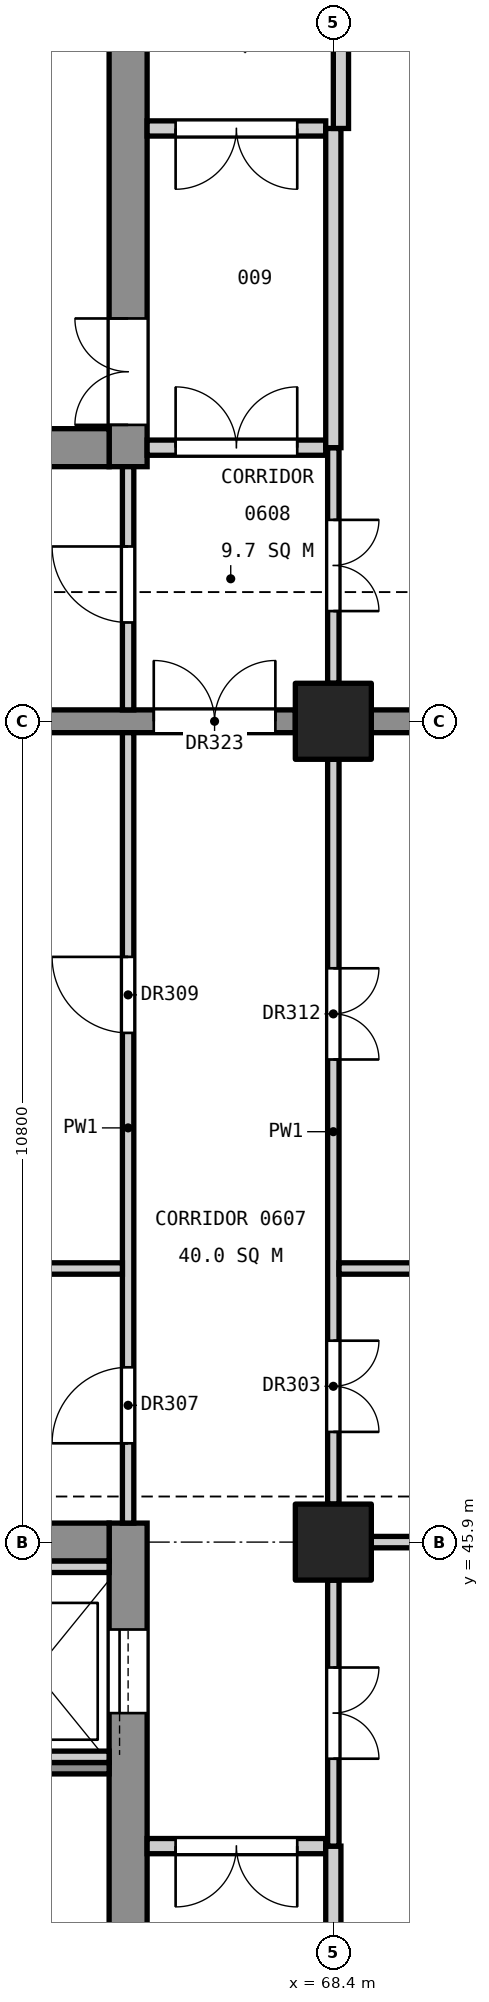
"""IFC4 building model, lengths in metres.
Left out: names, types, materials, properties, quantities, classifications, styles, units other than length and angle.
Written with IfcOpenShell. Run it as: python <this file> out.ifc"""

import sys

from ifc_helpers import new_model, si_unit, direction, frame, frame_2d, origin, origin_2d, place, context, subcontext, project, spatial, rectangle, extrude, element, fill, save


model = new_model("IFC4")
c1 = context("Model", 3, precision=1e-05, world=origin(), true_north=direction((0.0, 1.0)))
c2 = subcontext(c1, "Body", "Model", "MODEL_VIEW")
j1 = project(units=[si_unit("LENGTHUNIT", "METRE"), si_unit("PLANEANGLEUNIT", "RADIAN")], contexts=[c1])
p1 = place(None, origin())
s1 = spatial("IfcSite", under=j1, at=p1, CompositionType="ELEMENT")
p2 = place(p1, origin())
s2 = spatial("IfcBuilding", under=s1, at=p2, CompositionType="ELEMENT")
p3 = place(p2, frame((0.0, 0.0, 31.8)))
s3 = spatial("IfcBuildingStorey", under=s2, at=p3, CompositionType="ELEMENT", Elevation=31.8)
for number, where, z_axis, x_axis in (
    (1, (68.4, 45.9, 0.0), (0.0, 0.0, 1.0), (1.0, 0.0, 0.0)),
    (2, (68.4, 56.7, 0.0), (0.0, 0.0, 1.0), (1.0, 0.0, 0.0)),
):
    element("IfcColumn", number, at=place(p3, frame(where, z_axis=z_axis, x_axis=x_axis)), inside=s3, PredefinedType="COLUMN", context=c2, shape_type="SweptSolid", body=[
        extrude(rectangle(XDim=1.0, YDim=1.0, at=origin_2d()), origin(), (0.0, 0.0, 1.0), 4.8),
    ])
p4 = place(p3, frame((65.7, 34.85, 0.0), z_axis=(0.0, 0.0, 1.0), x_axis=(0.0, 1.0, 0.0)))
e3 = element("IfcWall", 3, at=p4, inside=s3, PredefinedType="SHEAR", context=c2, shape_type="SweptSolid", body=[
    extrude(rectangle(XDim=11.3, YDim=0.5, at=frame_2d((5.65, 0.0))), origin(), (0.0, 0.0, 1.0), 4.55),
])
p5 = place(p4, frame((0.55, 0.0, 0.0)))
e4 = element("IfcOpeningElement", 4, at=p5, cuts=e3, PredefinedType="OPENING", context=c2, shape_type="SweptSolid", body=[
    extrude(rectangle(XDim=1.4, YDim=2.1, at=frame_2d((0.7, 1.05))), frame((0.0, 0.26, 0.0), z_axis=(0.0, -1.0, 0.0), x_axis=(1.0, 0.0, 0.0)), (0.0, 0.0, 1.0), 0.52),
])
p6 = place(p4, frame((8.8, 0.0, 0.0)))
e5 = element("IfcOpeningElement", 5, at=p6, cuts=e3, PredefinedType="OPENING", context=c2, shape_type="SweptSolid", body=[
    extrude(rectangle(XDim=1.1, YDim=2.1, at=frame_2d((0.55, 1.05))), frame((0.0, 0.26, 0.0), z_axis=(0.0, -1.0, 0.0), x_axis=(1.0, 0.0, 0.0)), (0.0, 0.0, 1.0), 0.52),
])
p7 = place(p3, frame((61.45, 45.9, 0.0), z_axis=(0.0, 0.0, 1.0), x_axis=(1.0, 0.0, 0.0)))
e6 = element("IfcWall", 6, at=p7, inside=s3, PredefinedType="SHEAR", context=c2, shape_type="SweptSolid", body=[
    extrude(rectangle(XDim=4.0, YDim=0.5, at=frame_2d((2.0, 0.0))), origin(), (0.0, 0.0, 1.0), 4.55),
])
p8 = place(p3, frame((65.7, 60.05, 0.0), z_axis=(0.0, 0.0, 1.0), x_axis=(0.0, 1.0, 0.0)))
e7 = element("IfcWall", 7, at=p8, inside=s3, PredefinedType="SHEAR", context=c2, shape_type="SweptSolid", body=[
    extrude(rectangle(XDim=14.9, YDim=0.5, at=frame_2d((7.45, 0.0))), origin(), (0.0, 0.0, 1.0), 4.55),
])
p9 = place(p8, frame((0.55, 0.0, 0.0)))
e8 = element("IfcOpeningElement", 8, at=p9, cuts=e7, PredefinedType="OPENING", context=c2, shape_type="SweptSolid", body=[
    extrude(rectangle(XDim=1.4, YDim=2.1, at=frame_2d((0.7, 1.05))), frame((0.0, 0.26, 0.0), z_axis=(0.0, -1.0, 0.0), x_axis=(1.0, 0.0, 0.0)), (0.0, 0.0, 1.0), 0.52),
])
p10 = place(p8, frame((8.85, 0.0, 0.0)))
e9 = element("IfcOpeningElement", 9, at=p10, cuts=e7, PredefinedType="OPENING", context=c2, shape_type="SweptSolid", body=[
    extrude(rectangle(XDim=1.1, YDim=2.1, at=frame_2d((0.55, 1.05))), frame((0.0, 0.26, 0.0), z_axis=(0.0, -1.0, 0.0), x_axis=(1.0, 0.0, 0.0)), (0.0, 0.0, 1.0), 0.52),
])
p11 = place(p8, frame((11.4, 0.0, 0.0)))
e10 = element("IfcOpeningElement", 10, at=p11, cuts=e7, PredefinedType="OPENING", context=c2, shape_type="SweptSolid", body=[
    extrude(rectangle(XDim=1.1, YDim=2.1, at=frame_2d((0.55, 1.05))), frame((0.0, 0.26, 0.0), z_axis=(0.0, -1.0, 0.0), x_axis=(1.0, 0.0, 0.0)), (0.0, 0.0, 1.0), 0.52),
])
p12 = place(p3, frame((61.45, 60.3, 0.0), z_axis=(0.0, 0.0, 1.0), x_axis=(1.0, 0.0, 0.0)))
e11 = element("IfcWall", 11, at=p12, inside=s3, PredefinedType="SHEAR", context=c2, shape_type="SweptSolid", body=[
    extrude(rectangle(XDim=4.0, YDim=0.5, at=frame_2d((2.0, 0.0))), origin(), (0.0, 0.0, 1.0), 4.55),
])
p13 = place(p3, frame((61.7, 56.7, 0.0), z_axis=(0.0, 0.0, 1.0), x_axis=(1.0, 0.0, 0.0)))
e12 = element("IfcWall", 12, at=p13, inside=s3, PredefinedType="SHEAR", context=c2, shape_type="SweptSolid", body=[
    extrude(rectangle(XDim=6.2, YDim=0.3, at=frame_2d((3.1, 0.0))), origin(), (0.0, 0.0, 1.0), 4.55),
])
p14 = place(p13, frame((4.337, 0.0, 0.0)))
e13 = element("IfcOpeningElement", 13, at=p14, cuts=e12, PredefinedType="OPENING", context=c2, shape_type="SweptSolid", body=[
    extrude(rectangle(XDim=1.6, YDim=2.1, at=frame_2d((0.8, 1.05))), frame((0.0, 0.16, 0.0), z_axis=(0.0, -1.0, 0.0), x_axis=(1.0, 0.0, 0.0)), (0.0, 0.0, 1.0), 0.32),
])
p15 = place(p3, frame((68.9, 56.7, 0.0), z_axis=(0.0, 0.0, 1.0), x_axis=(1.0, 0.0, 0.0)))
e14 = element("IfcWall", 14, at=p15, inside=s3, PredefinedType="SHEAR", context=c2, shape_type="SweptSolid", body=[
    extrude(rectangle(XDim=9.8, YDim=0.3, at=frame_2d((4.9, 0.0))), origin(), (0.0, 0.0, 1.0), 4.55),
])
p16 = place(p3, frame((61.45, 42.925, 0.0), z_axis=(0.0, 0.0, 1.0), x_axis=(1.0, 0.0, 0.0)))
e15 = element("IfcWall", 15, at=p16, inside=s3, PredefinedType="SOLIDWALL", context=c2, shape_type="SweptSolid", body=[
    extrude(rectangle(XDim=4.0, YDim=0.15, at=frame_2d((2.0, 0.0))), origin(), (0.0, 0.0, 1.0), 4.55),
])
for number, where, z_axis, x_axis in (
    (16, (63.65, 43.075, 0.0), (0.0, 0.0, 1.0), (1.0, 0.0, 0.0)),
    (17, (63.65, 45.575, 0.0), (0.0, 0.0, 1.0), (1.0, 0.0, 0.0)),
):
    element("IfcWall", number, at=place(p3, frame(where, z_axis=z_axis, x_axis=x_axis)), inside=s3, PredefinedType="SOLIDWALL", context=c2, shape_type="SweptSolid", body=[
        extrude(rectangle(XDim=1.8, YDim=0.15, at=frame_2d((0.9, 0.0))), origin(), (0.0, 0.0, 1.0), 4.8),
    ])
p17 = place(p3, frame((65.7, 46.15, 0.0), z_axis=(0.0, 0.0, 1.0), x_axis=(0.0, 1.0, 0.0)))
e18 = element("IfcWall", 18, at=p17, inside=s3, PredefinedType="PARTITIONING", context=c2, shape_type="SweptSolid", body=[
    extrude(rectangle(XDim=10.4, YDim=0.15, at=frame_2d((5.2, 0.0))), origin(), (0.0, 0.0, 1.0), 3.55),
])
p18 = place(p17, frame((1.05, 0.0, 0.0)))
e19 = element("IfcOpeningElement", 19, at=p18, cuts=e18, PredefinedType="OPENING", context=c2, shape_type="SweptSolid", body=[
    extrude(rectangle(XDim=1.0, YDim=2.1, at=frame_2d((0.5, 1.05))), frame((0.0, 0.085, 0.0), z_axis=(0.0, -1.0, 0.0), x_axis=(1.0, 0.0, 0.0)), (0.0, 0.0, 1.0), 0.17),
])
p19 = place(p17, frame((6.45, 0.0, 0.0)))
e20 = element("IfcOpeningElement", 20, at=p19, cuts=e18, PredefinedType="OPENING", context=c2, shape_type="SweptSolid", body=[
    extrude(rectangle(XDim=1.0, YDim=2.1, at=frame_2d((0.5, 1.05))), frame((0.0, 0.085, 0.0), z_axis=(0.0, -1.0, 0.0), x_axis=(1.0, 0.0, 0.0)), (0.0, 0.0, 1.0), 0.17),
])
p20 = place(p3, frame((65.7, 56.85, 0.0), z_axis=(0.0, 0.0, 1.0), x_axis=(0.0, 1.0, 0.0)))
e21 = element("IfcWall", 21, at=p20, inside=s3, PredefinedType="PARTITIONING", context=c2, shape_type="SweptSolid", body=[
    extrude(rectangle(XDim=3.2, YDim=0.15, at=frame_2d((1.6, 0.0))), origin(), (0.0, 0.0, 1.0), 3.55),
])
p21 = place(p20, frame((1.15, 0.0, 0.0)))
e22 = element("IfcOpeningElement", 22, at=p21, cuts=e21, PredefinedType="OPENING", context=c2, shape_type="SweptSolid", body=[
    extrude(rectangle(XDim=1.0, YDim=2.1, at=frame_2d((0.5, 1.05))), frame((0.0, 0.085, 0.0), z_axis=(0.0, -1.0, 0.0), x_axis=(1.0, 0.0, 0.0)), (0.0, 0.0, 1.0), 0.17),
])
p22 = place(p3, frame((61.35, 49.5, 0.0), z_axis=(0.0, 0.0, 1.0), x_axis=(1.0, 0.0, 0.0)))
e23 = element("IfcWall", 23, at=p22, inside=s3, PredefinedType="PARTITIONING", context=c2, shape_type="SweptSolid", body=[
    extrude(rectangle(XDim=4.275, YDim=0.15, at=frame_2d((2.137, 0.0))), origin(), (0.0, 0.0, 1.0), 3.85),
])
p23 = place(p3, frame((65.95, 41.9, 0.0), z_axis=(0.0, 0.0, 1.0), x_axis=(1.0, 0.0, 0.0)))
e24 = element("IfcWall", 24, at=p23, inside=s3, PredefinedType="PARTITIONING", context=c2, shape_type="SweptSolid", body=[
    extrude(rectangle(XDim=2.35, YDim=0.2, at=frame_2d((1.175, 0.0))), origin(), (0.0, 0.0, 1.0), 3.55),
])
p24 = place(p23, frame((0.375, 0.0, 0.0)))
e25 = element("IfcOpeningElement", 25, at=p24, cuts=e24, PredefinedType="OPENING", context=c2, shape_type="SweptSolid", body=[
    extrude(rectangle(XDim=1.6, YDim=2.1, at=frame_2d((0.8, 1.05))), frame((0.0, 0.11, 0.0), z_axis=(0.0, -1.0, 0.0), x_axis=(1.0, 0.0, 0.0)), (0.0, 0.0, 1.0), 0.22),
])
p25 = place(p3, frame((65.95, 60.3, 0.0), z_axis=(0.0, 0.0, 1.0), x_axis=(1.0, 0.0, 0.0)))
e26 = element("IfcWall", 26, at=p25, inside=s3, PredefinedType="PARTITIONING", context=c2, shape_type="SweptSolid", body=[
    extrude(rectangle(XDim=2.35, YDim=0.2, at=frame_2d((1.175, 0.0))), origin(), (0.0, 0.0, 1.0), 3.85),
])
p26 = place(p25, frame((0.375, 0.0, 0.0)))
e27 = element("IfcOpeningElement", 27, at=p26, cuts=e26, PredefinedType="OPENING", context=c2, shape_type="SweptSolid", body=[
    extrude(rectangle(XDim=1.6, YDim=2.1, at=frame_2d((0.8, 1.05))), frame((0.0, 0.11, 0.0), z_axis=(0.0, -1.0, 0.0), x_axis=(1.0, 0.0, 0.0)), (0.0, 0.0, 1.0), 0.22),
])
p27 = place(p3, frame((65.95, 64.5, 0.0), z_axis=(0.0, 0.0, 1.0), x_axis=(1.0, 0.0, 0.0)))
e28 = element("IfcWall", 28, at=p27, inside=s3, PredefinedType="PARTITIONING", context=c2, shape_type="SweptSolid", body=[
    extrude(rectangle(XDim=2.35, YDim=0.2, at=frame_2d((1.175, 0.0))), origin(), (0.0, 0.0, 1.0), 3.55),
])
p28 = place(p27, frame((0.375, 0.0, 0.0)))
e29 = element("IfcOpeningElement", 29, at=p28, cuts=e28, PredefinedType="OPENING", context=c2, shape_type="SweptSolid", body=[
    extrude(rectangle(XDim=1.6, YDim=2.1, at=frame_2d((0.8, 1.05))), frame((0.0, 0.11, 0.0), z_axis=(0.0, -1.0, 0.0), x_axis=(1.0, 0.0, 0.0)), (0.0, 0.0, 1.0), 0.22),
])
p29 = place(p3, frame((68.4, 35.6, 0.0), z_axis=(0.0, 0.0, 1.0), x_axis=(0.0, 1.0, 0.0)))
e30 = element("IfcWall", 30, at=p29, inside=s3, PredefinedType="PARTITIONING", context=c2, shape_type="SweptSolid", body=[
    extrude(rectangle(XDim=6.3, YDim=0.2, at=frame_2d((3.15, 0.0))), origin(), (0.0, 0.0, 1.0), 3.55),
])
p30 = place(p3, frame((68.4, 41.9, 0.0), z_axis=(0.0, 0.0, 1.0), x_axis=(0.0, 1.0, 0.0)))
e31 = element("IfcWall", 31, at=p30, inside=s3, PredefinedType="PARTITIONING", context=c2, shape_type="SweptSolid", body=[
    extrude(rectangle(XDim=3.5, YDim=0.15, at=frame_2d((1.75, 0.0))), origin(), (0.0, 0.0, 1.0), 3.55),
])
p31 = place(p30, frame((1.15, 0.0, 0.0)))
e32 = element("IfcOpeningElement", 32, at=p31, cuts=e31, PredefinedType="OPENING", context=c2, shape_type="SweptSolid", body=[
    extrude(rectangle(XDim=1.2, YDim=2.1, at=frame_2d((0.6, 1.05))), frame((0.0, 0.085, 0.0), z_axis=(0.0, -1.0, 0.0), x_axis=(1.0, 0.0, 0.0)), (0.0, 0.0, 1.0), 0.17),
])
p32 = place(p3, frame((68.4, 46.4, 0.0), z_axis=(0.0, 0.0, 1.0), x_axis=(0.0, 1.0, 0.0)))
e33 = element("IfcWall", 33, at=p32, inside=s3, PredefinedType="PARTITIONING", context=c2, shape_type="SweptSolid", body=[
    extrude(rectangle(XDim=9.8, YDim=0.15, at=frame_2d((4.9, 0.0))), origin(), (0.0, 0.0, 1.0), 3.55),
])
p33 = place(p32, frame((0.95, 0.0, 0.0)))
e34 = element("IfcOpeningElement", 34, at=p33, cuts=e33, PredefinedType="OPENING", context=c2, shape_type="SweptSolid", body=[
    extrude(rectangle(XDim=1.2, YDim=2.1, at=frame_2d((0.6, 1.05))), frame((0.0, 0.085, 0.0), z_axis=(0.0, -1.0, 0.0), x_axis=(1.0, 0.0, 0.0)), (0.0, 0.0, 1.0), 0.17),
])
p34 = place(p32, frame((5.85, 0.0, 0.0)))
e35 = element("IfcOpeningElement", 35, at=p34, cuts=e33, PredefinedType="OPENING", context=c2, shape_type="SweptSolid", body=[
    extrude(rectangle(XDim=1.2, YDim=2.1, at=frame_2d((0.6, 1.05))), frame((0.0, 0.085, 0.0), z_axis=(0.0, -1.0, 0.0), x_axis=(1.0, 0.0, 0.0)), (0.0, 0.0, 1.0), 0.17),
])
p35 = place(p3, frame((68.4, 57.2, 0.0), z_axis=(0.0, 0.0, 1.0), x_axis=(0.0, 1.0, 0.0)))
e36 = element("IfcWall", 36, at=p35, inside=s3, PredefinedType="PARTITIONING", context=c2, shape_type="SweptSolid", body=[
    extrude(rectangle(XDim=3.1, YDim=0.15, at=frame_2d((1.55, 0.0))), origin(), (0.0, 0.0, 1.0), 3.55),
])
p36 = place(p35, frame((0.95, 0.0, 0.0)))
e37 = element("IfcOpeningElement", 37, at=p36, cuts=e36, PredefinedType="OPENING", context=c2, shape_type="SweptSolid", body=[
    extrude(rectangle(XDim=1.2, YDim=2.1, at=frame_2d((0.6, 1.05))), frame((0.0, 0.085, 0.0), z_axis=(0.0, -1.0, 0.0), x_axis=(1.0, 0.0, 0.0)), (0.0, 0.0, 1.0), 0.17),
])
p37 = place(p3, frame((68.4, 60.3, 0.0), z_axis=(0.0, 0.0, 1.0), x_axis=(0.0, 1.0, 0.0)))
e38 = element("IfcWall", 38, at=p37, inside=s3, PredefinedType="PARTITIONING", context=c2, shape_type="SweptSolid", body=[
    extrude(rectangle(XDim=4.2, YDim=0.2, at=frame_2d((2.1, 0.0))), origin(), (0.0, 0.0, 1.0), 3.55),
])
p38 = place(p3, frame((68.5, 64.5, 0.0), z_axis=(0.0, 0.0, 1.0), x_axis=(0.0, 1.0, 0.0)))
e39 = element("IfcWall", 39, at=p38, inside=s3, PredefinedType="PARTITIONING", context=c2, shape_type="SweptSolid", body=[
    extrude(rectangle(XDim=2.5, YDim=0.2, at=frame_2d((1.25, 0.0))), origin(), (0.0, 0.0, 1.0), 3.55),
])
p39 = place(p3, frame((68.9, 45.9, 0.0), z_axis=(0.0, 0.0, 1.0), x_axis=(1.0, 0.0, 0.0)))
e40 = element("IfcWall", 40, at=p39, inside=s3, PredefinedType="PARTITIONING", context=c2, shape_type="SweptSolid", body=[
    extrude(rectangle(XDim=9.8, YDim=0.15, at=frame_2d((4.9, 0.0))), origin(), (0.0, 0.0, 1.0), 3.85),
])
p40 = place(p3, frame((68.475, 49.5, 0.0), z_axis=(0.0, 0.0, 1.0), x_axis=(1.0, 0.0, 0.0)))
e41 = element("IfcWall", 41, at=p40, inside=s3, PredefinedType="PARTITIONING", context=c2, shape_type="SweptSolid", body=[
    extrude(rectangle(XDim=10.575, YDim=0.15, at=frame_2d((5.288, 0.0))), origin(), (0.0, 0.0, 1.0), 3.85),
])
p41 = place(p9, origin())
e42 = element("IfcDoor", 42, at=p41, inside=s3, OperationType="DOUBLE_DOOR_SINGLE_SWING", PredefinedType="DOOR", context=c2, shape_type="SweptSolid", body=[
    extrude(rectangle(XDim=1.4, YDim=2.1, at=frame_2d((0.7, 1.05))), frame((0.0, 0.025, 0.0), z_axis=(0.0, -1.0, 0.0), x_axis=(1.0, 0.0, 0.0)), (0.0, 0.0, 1.0), 0.05),
])
fill(e8, e42)
p42 = place(p6, origin())
e43 = element("IfcDoor", 43, at=p42, inside=s3, OperationType="SLIDING_TO_LEFT", PredefinedType="DOOR", context=c2, shape_type="SweptSolid", body=[
    extrude(rectangle(XDim=1.1, YDim=2.1, at=frame_2d((0.55, 1.05))), frame((0.0, 0.025, 0.0), z_axis=(0.0, -1.0, 0.0), x_axis=(1.0, 0.0, 0.0)), (0.0, 0.0, 1.0), 0.05),
])
fill(e5, e43)
p43 = place(p21, origin())
e44 = element("IfcDoor", 44, at=p43, inside=s3, OperationType="SINGLE_SWING_RIGHT", PredefinedType="DOOR", context=c2, shape_type="SweptSolid", body=[
    extrude(rectangle(XDim=1.0, YDim=2.1, at=frame_2d((0.5, 1.05))), frame((0.0, 0.025, 0.0), z_axis=(0.0, -1.0, 0.0), x_axis=(1.0, 0.0, 0.0)), (0.0, 0.0, 1.0), 0.05),
])
fill(e22, e44)
p44 = place(p33, frame((1.2, 0.0, 0.0), z_axis=(0.0, 0.0, 1.0), x_axis=(-1.0, 0.0, 0.0)))
e45 = element("IfcDoor", 45, at=p44, inside=s3, OperationType="DOUBLE_DOOR_SINGLE_SWING", PredefinedType="DOOR", context=c2, shape_type="SweptSolid", body=[
    extrude(rectangle(XDim=1.2, YDim=2.1, at=frame_2d((0.6, 1.05))), frame((0.0, 0.025, 0.0), z_axis=(0.0, -1.0, 0.0), x_axis=(1.0, 0.0, 0.0)), (0.0, 0.0, 1.0), 0.05),
])
fill(e34, e45)
p45 = place(p18, origin())
e46 = element("IfcDoor", 46, at=p45, inside=s3, OperationType="SINGLE_SWING_LEFT", PredefinedType="DOOR", context=c2, shape_type="SweptSolid", body=[
    extrude(rectangle(XDim=1.0, YDim=2.1, at=frame_2d((0.5, 1.05))), frame((0.0, 0.025, 0.0), z_axis=(0.0, -1.0, 0.0), x_axis=(1.0, 0.0, 0.0)), (0.0, 0.0, 1.0), 0.05),
])
fill(e19, e46)
p46 = place(p19, origin())
e47 = element("IfcDoor", 47, at=p46, inside=s3, OperationType="SINGLE_SWING_RIGHT", PredefinedType="DOOR", context=c2, shape_type="SweptSolid", body=[
    extrude(rectangle(XDim=1.0, YDim=2.1, at=frame_2d((0.5, 1.05))), frame((0.0, 0.025, 0.0), z_axis=(0.0, -1.0, 0.0), x_axis=(1.0, 0.0, 0.0)), (0.0, 0.0, 1.0), 0.05),
])
fill(e20, e47)
p47 = place(p31, frame((1.2, 0.0, 0.0), z_axis=(0.0, 0.0, 1.0), x_axis=(-1.0, 0.0, 0.0)))
e48 = element("IfcDoor", 48, at=p47, inside=s3, OperationType="DOUBLE_DOOR_SINGLE_SWING", PredefinedType="DOOR", context=c2, shape_type="SweptSolid", body=[
    extrude(rectangle(XDim=1.2, YDim=2.1, at=frame_2d((0.6, 1.05))), frame((0.0, 0.025, 0.0), z_axis=(0.0, -1.0, 0.0), x_axis=(1.0, 0.0, 0.0)), (0.0, 0.0, 1.0), 0.05),
])
fill(e32, e48)
p48 = place(p34, frame((1.2, 0.0, 0.0), z_axis=(0.0, 0.0, 1.0), x_axis=(-1.0, 0.0, 0.0)))
e49 = element("IfcDoor", 49, at=p48, inside=s3, OperationType="DOUBLE_DOOR_SINGLE_SWING", PredefinedType="DOOR", context=c2, shape_type="SweptSolid", body=[
    extrude(rectangle(XDim=1.2, YDim=2.1, at=frame_2d((0.6, 1.05))), frame((0.0, 0.025, 0.0), z_axis=(0.0, -1.0, 0.0), x_axis=(1.0, 0.0, 0.0)), (0.0, 0.0, 1.0), 0.05),
])
fill(e35, e49)
p49 = place(p36, frame((1.2, 0.0, 0.0), z_axis=(0.0, 0.0, 1.0), x_axis=(-1.0, 0.0, 0.0)))
e50 = element("IfcDoor", 50, at=p49, inside=s3, OperationType="DOUBLE_DOOR_SINGLE_SWING", PredefinedType="DOOR", context=c2, shape_type="SweptSolid", body=[
    extrude(rectangle(XDim=1.2, YDim=2.1, at=frame_2d((0.6, 1.05))), frame((0.0, 0.025, 0.0), z_axis=(0.0, -1.0, 0.0), x_axis=(1.0, 0.0, 0.0)), (0.0, 0.0, 1.0), 0.05),
])
fill(e37, e50)
p50 = place(p24, frame((1.6, 0.0, 0.0), z_axis=(0.0, 0.0, 1.0), x_axis=(-1.0, 0.0, 0.0)))
e51 = element("IfcDoor", 51, at=p50, inside=s3, OperationType="DOUBLE_DOOR_SINGLE_SWING", PredefinedType="DOOR", context=c2, shape_type="SweptSolid", body=[
    extrude(rectangle(XDim=1.6, YDim=2.1, at=frame_2d((0.8, 1.05))), frame((0.0, 0.025, 0.0), z_axis=(0.0, -1.0, 0.0), x_axis=(1.0, 0.0, 0.0)), (0.0, 0.0, 1.0), 0.05),
])
fill(e25, e51)
p51 = place(p26, origin())
e52 = element("IfcDoor", 52, at=p51, inside=s3, OperationType="DOUBLE_DOOR_SINGLE_SWING", PredefinedType="DOOR", context=c2, shape_type="SweptSolid", body=[
    extrude(rectangle(XDim=1.6, YDim=2.1, at=frame_2d((0.8, 1.05))), frame((0.0, 0.025, 0.0), z_axis=(0.0, -1.0, 0.0), x_axis=(1.0, 0.0, 0.0)), (0.0, 0.0, 1.0), 0.05),
])
fill(e27, e52)
p52 = place(p28, frame((1.6, 0.0, 0.0), z_axis=(0.0, 0.0, 1.0), x_axis=(-1.0, 0.0, 0.0)))
e53 = element("IfcDoor", 53, at=p52, inside=s3, OperationType="DOUBLE_DOOR_SINGLE_SWING", PredefinedType="DOOR", context=c2, shape_type="SweptSolid", body=[
    extrude(rectangle(XDim=1.6, YDim=2.1, at=frame_2d((0.8, 1.05))), frame((0.0, 0.025, 0.0), z_axis=(0.0, -1.0, 0.0), x_axis=(1.0, 0.0, 0.0)), (0.0, 0.0, 1.0), 0.05),
])
fill(e29, e53)
p53 = place(p14, origin())
e54 = element("IfcDoor", 54, at=p53, inside=s3, OperationType="DOUBLE_DOOR_SINGLE_SWING", PredefinedType="DOOR", context=c2, shape_type="SweptSolid", body=[
    extrude(rectangle(XDim=1.6, YDim=2.1, at=frame_2d((0.8, 1.05))), frame((0.0, 0.025, 0.0), z_axis=(0.0, -1.0, 0.0), x_axis=(1.0, 0.0, 0.0)), (0.0, 0.0, 1.0), 0.05),
])
fill(e13, e54)
save(model, sys.argv[1])
